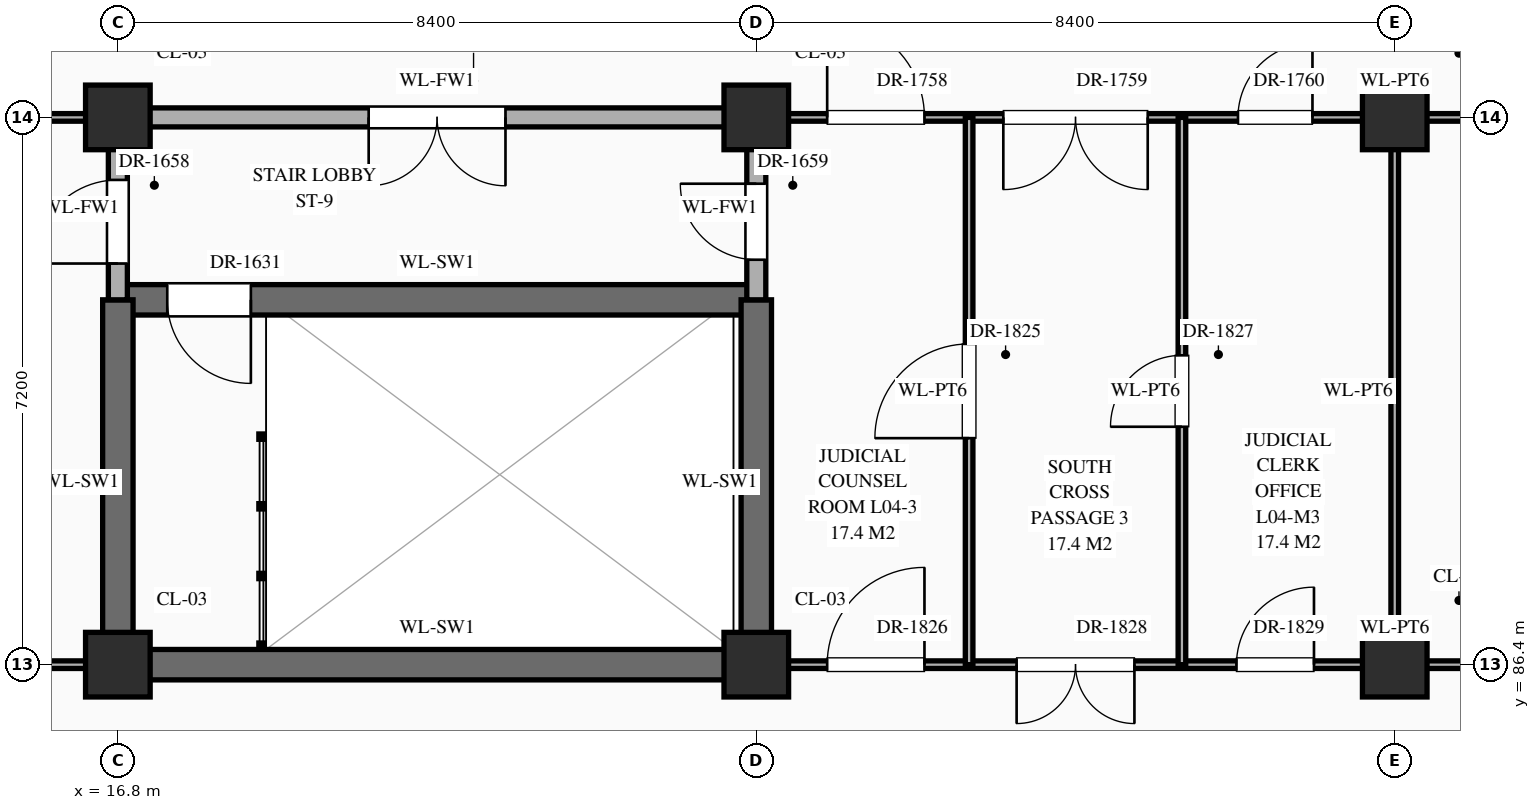
"""IFC4 building model, lengths in metres.
Left out: names, types, materials, properties, quantities, classifications, styles, units other than length and angle.
Written with IfcOpenShell. Run it as: python <this file> out.ifc"""

import sys

from ifc_helpers import new_model, si_unit, direction, frame, frame_2d, origin, origin_2d, place, context, subcontext, project, spatial, rectangle, extrude, element, fill, save


model = new_model("IFC4")
c1 = context("Model", 3, precision=1e-05, world=origin(), true_north=direction((0.0, 1.0)))
c2 = subcontext(c1, "Body", "Model", "MODEL_VIEW")
j1 = project(units=[si_unit("LENGTHUNIT", "METRE"), si_unit("PLANEANGLEUNIT", "RADIAN")], contexts=[c1])
p1 = place(None, origin())
s1 = spatial("IfcSite", under=j1, at=p1, CompositionType="ELEMENT")
p2 = place(p1, origin())
s2 = spatial("IfcBuilding", under=s1, at=p2, CompositionType="ELEMENT")
p3 = place(p2, frame((0.0, 0.0, 16.2)))
s3 = spatial("IfcBuildingStorey", under=s2, at=p3, CompositionType="ELEMENT", Elevation=16.2)
for number, where, z_axis, x_axis in (
    (1, (16.8, 86.4, 0.0), (0.0, 0.0, 1.0), (1.0, 0.0, 0.0)),
    (2, (16.8, 93.6, 0.0), (0.0, 0.0, 1.0), (1.0, 0.0, 0.0)),
    (3, (25.2, 86.4, 0.0), (0.0, 0.0, 1.0), (1.0, 0.0, 0.0)),
    (4, (25.2, 93.6, 0.0), (0.0, 0.0, 1.0), (1.0, 0.0, 0.0)),
    (5, (33.6, 86.4, 0.0), (0.0, 0.0, 1.0), (1.0, 0.0, 0.0)),
    (6, (33.6, 93.6, 0.0), (0.0, 0.0, 1.0), (1.0, 0.0, 0.0)),
):
    element("IfcColumn", number, at=place(p3, frame(where, z_axis=z_axis, x_axis=x_axis)), inside=s3, PredefinedType="COLUMN", context=c2, shape_type="SweptSolid", body=[
        extrude(rectangle(XDim=0.85, YDim=0.85, at=origin_2d()), origin(), (0.0, 0.0, 1.0), 5.4),
    ])
p4 = place(p3, frame((0.04, 86.4, 0.0), z_axis=(0.0, 0.0, 1.0), x_axis=(1.0, 0.0, 0.0)))
e7 = element("IfcWall", 7, at=p4, inside=s3, PredefinedType="STANDARD", context=c2, shape_type="SweptSolid", body=[
    extrude(rectangle(XDim=16.76, YDim=0.1, at=frame_2d((8.38, 0.0))), origin(), (0.0, 0.0, 1.0), 4.35),
])
p5 = place(p4, frame((1.012, 0.0, 0.0)))
e8 = element("IfcOpeningElement", 8, at=p5, cuts=e7, PredefinedType="OPENING", context=c2, shape_type="SweptSolid", body=[
    extrude(rectangle(XDim=1.04, YDim=2.2, at=frame_2d((0.52, 1.1))), frame((0.0, 0.062, 0.0), z_axis=(0.0, -1.0, 0.0), x_axis=(1.0, 0.0, 0.0)), (0.0, 0.0, 1.0), 0.124),
])
p6 = place(p4, frame((3.385, 0.0, 0.0)))
e9 = element("IfcOpeningElement", 9, at=p6, cuts=e7, PredefinedType="OPENING", context=c2, shape_type="SweptSolid", body=[
    extrude(rectangle(XDim=1.55, YDim=2.35, at=frame_2d((0.775, 1.175))), frame((0.0, 0.062, 0.0), z_axis=(0.0, -1.0, 0.0), x_axis=(1.0, 0.0, 0.0)), (0.0, 0.0, 1.0), 0.124),
])
p7 = place(p4, frame((6.208, 0.0, 0.0)))
e10 = element("IfcOpeningElement", 10, at=p7, cuts=e7, PredefinedType="OPENING", context=c2, shape_type="SweptSolid", body=[
    extrude(rectangle(XDim=1.16, YDim=2.3, at=frame_2d((0.58, 1.15))), frame((0.0, 0.062, 0.0), z_axis=(0.0, -1.0, 0.0), x_axis=(1.0, 0.0, 0.0)), (0.0, 0.0, 1.0), 0.124),
])
p8 = place(p4, frame((11.96, 0.0, 0.0)))
e11 = element("IfcOpeningElement", 11, at=p8, cuts=e7, PredefinedType="OPENING", context=c2, shape_type="SweptSolid", body=[
    extrude(rectangle(XDim=1.2, YDim=2.35, at=frame_2d((0.6, 1.175))), frame((0.0, 0.062, 0.0), z_axis=(0.0, -1.0, 0.0), x_axis=(1.0, 0.0, 0.0)), (0.0, 0.0, 1.0), 0.124),
])
p9 = place(p3, frame((16.8, 86.4, 0.0), z_axis=(0.0, 0.0, 1.0), x_axis=(1.0, 0.0, 0.0)))
e12 = element("IfcWall", 12, at=p9, inside=s3, PredefinedType="SHEAR", context=c2, shape_type="SweptSolid", body=[
    extrude(rectangle(XDim=8.4, YDim=0.4, at=frame_2d((4.2, 0.0))), origin(), (0.0, 0.0, 1.0), 5.05),
])
p10 = place(p3, frame((25.2, 86.4, 0.0), z_axis=(0.0, 0.0, 1.0), x_axis=(1.0, 0.0, 0.0)))
e13 = element("IfcWall", 13, at=p10, inside=s3, PredefinedType="STANDARD", context=c2, shape_type="SweptSolid", body=[
    extrude(rectangle(XDim=16.8, YDim=0.1, at=frame_2d((8.4, 0.0))), origin(), (0.0, 0.0, 1.0), 4.27),
])
p11 = place(p10, frame((0.933, 0.0, 0.0)))
e14 = element("IfcOpeningElement", 14, at=p11, cuts=e13, PredefinedType="OPENING", context=c2, shape_type="SweptSolid", body=[
    extrude(rectangle(XDim=1.28, YDim=2.35, at=frame_2d((0.64, 1.175))), frame((0.0, 0.062, 0.0), z_axis=(0.0, -1.0, 0.0), x_axis=(1.0, 0.0, 0.0)), (0.0, 0.0, 1.0), 0.124),
])
p12 = place(p10, frame((3.425, 0.0, 0.0)))
e15 = element("IfcOpeningElement", 15, at=p12, cuts=e13, PredefinedType="OPENING", context=c2, shape_type="SweptSolid", body=[
    extrude(rectangle(XDim=1.55, YDim=2.35, at=frame_2d((0.775, 1.175))), frame((0.0, 0.062, 0.0), z_axis=(0.0, -1.0, 0.0), x_axis=(1.0, 0.0, 0.0)), (0.0, 0.0, 1.0), 0.124),
])
p13 = place(p10, frame((6.317, 0.0, 0.0)))
e16 = element("IfcOpeningElement", 16, at=p13, cuts=e13, PredefinedType="OPENING", context=c2, shape_type="SweptSolid", body=[
    extrude(rectangle(XDim=1.02, YDim=2.4, at=frame_2d((0.51, 1.2))), frame((0.0, 0.062, 0.0), z_axis=(0.0, -1.0, 0.0), x_axis=(1.0, 0.0, 0.0)), (0.0, 0.0, 1.0), 0.124),
])
p14 = place(p10, frame((12.07, 0.0, 0.0)))
e17 = element("IfcOpeningElement", 17, at=p14, cuts=e13, PredefinedType="OPENING", context=c2, shape_type="SweptSolid", body=[
    extrude(rectangle(XDim=1.06, YDim=2.4, at=frame_2d((0.53, 1.2))), frame((0.0, 0.062, 0.0), z_axis=(0.0, -1.0, 0.0), x_axis=(1.0, 0.0, 0.0)), (0.0, 0.0, 1.0), 0.124),
])
p15 = place(p3, frame((16.8, 91.2, 0.0), z_axis=(0.0, 0.0, 1.0), x_axis=(1.0, 0.0, 0.0)))
e18 = element("IfcWall", 18, at=p15, inside=s3, PredefinedType="SHEAR", context=c2, shape_type="SweptSolid", body=[
    extrude(rectangle(XDim=8.4, YDim=0.4, at=frame_2d((4.2, 0.0))), origin(), (0.0, 0.0, 1.0), 5.05),
])
p16 = place(p15, frame((0.65, 0.0, 0.0)))
e19 = element("IfcOpeningElement", 19, at=p16, cuts=e18, PredefinedType="OPENING", context=c2, shape_type="SweptSolid", body=[
    extrude(rectangle(XDim=1.1, YDim=2.2, at=frame_2d((0.55, 1.1))), frame((0.0, 0.212, 0.0), z_axis=(0.0, -1.0, 0.0), x_axis=(1.0, 0.0, 0.0)), (0.0, 0.0, 1.0), 0.424),
])
p17 = place(p3, frame((0.04, 93.6, 0.0), z_axis=(0.0, 0.0, 1.0), x_axis=(1.0, 0.0, 0.0)))
e20 = element("IfcWall", 20, at=p17, inside=s3, PredefinedType="STANDARD", context=c2, shape_type="SweptSolid", body=[
    extrude(rectangle(XDim=16.76, YDim=0.1, at=frame_2d((8.38, 0.0))), origin(), (0.0, 0.0, 1.0), 4.35),
])
p18 = place(p17, frame((0.972, 0.0, 0.0)))
e21 = element("IfcOpeningElement", 21, at=p18, cuts=e20, PredefinedType="OPENING", context=c2, shape_type="SweptSolid", body=[
    extrude(rectangle(XDim=1.12, YDim=2.25, at=frame_2d((0.56, 1.125))), frame((0.0, 0.062, 0.0), z_axis=(0.0, -1.0, 0.0), x_axis=(1.0, 0.0, 0.0)), (0.0, 0.0, 1.0), 0.124),
])
p19 = place(p17, frame((3.335, 0.0, 0.0)))
e22 = element("IfcOpeningElement", 22, at=p19, cuts=e20, PredefinedType="OPENING", context=c2, shape_type="SweptSolid", body=[
    extrude(rectangle(XDim=1.65, YDim=2.4, at=frame_2d((0.825, 1.2))), frame((0.0, 0.062, 0.0), z_axis=(0.0, -1.0, 0.0), x_axis=(1.0, 0.0, 0.0)), (0.0, 0.0, 1.0), 0.124),
])
p20 = place(p17, frame((6.188, 0.0, 0.0)))
e23 = element("IfcOpeningElement", 23, at=p20, cuts=e20, PredefinedType="OPENING", context=c2, shape_type="SweptSolid", body=[
    extrude(rectangle(XDim=1.2, YDim=2.35, at=frame_2d((0.6, 1.175))), frame((0.0, 0.062, 0.0), z_axis=(0.0, -1.0, 0.0), x_axis=(1.0, 0.0, 0.0)), (0.0, 0.0, 1.0), 0.124),
])
p21 = place(p17, frame((11.94, 0.0, 0.0)))
e24 = element("IfcOpeningElement", 24, at=p21, cuts=e20, PredefinedType="OPENING", context=c2, shape_type="SweptSolid", body=[
    extrude(rectangle(XDim=1.24, YDim=2.3, at=frame_2d((0.62, 1.15))), frame((0.0, 0.062, 0.0), z_axis=(0.0, -1.0, 0.0), x_axis=(1.0, 0.0, 0.0)), (0.0, 0.0, 1.0), 0.124),
])
p22 = place(p3, frame((16.8, 93.6, 0.0), z_axis=(0.0, 0.0, 1.0), x_axis=(1.0, 0.0, 0.0)))
e25 = element("IfcWall", 25, at=p22, inside=s3, PredefinedType="STANDARD", context=c2, shape_type="SweptSolid", body=[
    extrude(rectangle(XDim=8.4, YDim=0.25, at=frame_2d((4.2, 0.0))), origin(), (0.0, 0.0, 1.0), 4.2),
])
p23 = place(p22, frame((3.3, 0.0, 0.0)))
e26 = element("IfcOpeningElement", 26, at=p23, cuts=e25, PredefinedType="OPENING", context=c2, shape_type="SweptSolid", body=[
    extrude(rectangle(XDim=1.8, YDim=2.35, at=frame_2d((0.9, 1.175))), frame((0.0, 0.137, 0.0), z_axis=(0.0, -1.0, 0.0), x_axis=(1.0, 0.0, 0.0)), (0.0, 0.0, 1.0), 0.274),
])
p24 = place(p3, frame((25.2, 93.6, 0.0), z_axis=(0.0, 0.0, 1.0), x_axis=(1.0, 0.0, 0.0)))
e27 = element("IfcWall", 27, at=p24, inside=s3, PredefinedType="STANDARD", context=c2, shape_type="SweptSolid", body=[
    extrude(rectangle(XDim=16.8, YDim=0.1, at=frame_2d((8.4, 0.0))), origin(), (0.0, 0.0, 1.0), 4.27),
])
p25 = place(p24, frame((0.933, 0.0, 0.0)))
e28 = element("IfcOpeningElement", 28, at=p25, cuts=e27, PredefinedType="OPENING", context=c2, shape_type="SweptSolid", body=[
    extrude(rectangle(XDim=1.28, YDim=2.35, at=frame_2d((0.64, 1.175))), frame((0.0, 0.062, 0.0), z_axis=(0.0, -1.0, 0.0), x_axis=(1.0, 0.0, 0.0)), (0.0, 0.0, 1.0), 0.124),
])
p26 = place(p24, frame((3.25, 0.0, 0.0)))
e29 = element("IfcOpeningElement", 29, at=p26, cuts=e27, PredefinedType="OPENING", context=c2, shape_type="SweptSolid", body=[
    extrude(rectangle(XDim=1.9, YDim=2.5, at=frame_2d((0.95, 1.25))), frame((0.0, 0.062, 0.0), z_axis=(0.0, -1.0, 0.0), x_axis=(1.0, 0.0, 0.0)), (0.0, 0.0, 1.0), 0.124),
])
p27 = place(p24, frame((6.337, 0.0, 0.0)))
e30 = element("IfcOpeningElement", 30, at=p27, cuts=e27, PredefinedType="OPENING", context=c2, shape_type="SweptSolid", body=[
    extrude(rectangle(XDim=0.98, YDim=2.35, at=frame_2d((0.49, 1.175))), frame((0.0, 0.062, 0.0), z_axis=(0.0, -1.0, 0.0), x_axis=(1.0, 0.0, 0.0)), (0.0, 0.0, 1.0), 0.124),
])
p28 = place(p24, frame((12.09, 0.0, 0.0)))
e31 = element("IfcOpeningElement", 31, at=p28, cuts=e27, PredefinedType="OPENING", context=c2, shape_type="SweptSolid", body=[
    extrude(rectangle(XDim=1.02, YDim=2.4, at=frame_2d((0.51, 1.2))), frame((0.0, 0.062, 0.0), z_axis=(0.0, -1.0, 0.0), x_axis=(1.0, 0.0, 0.0)), (0.0, 0.0, 1.0), 0.124),
])
p29 = place(p3, frame((16.8, 86.4, 0.0), z_axis=(0.0, 0.0, 1.0), x_axis=(0.0, 1.0, 0.0)))
e32 = element("IfcWall", 32, at=p29, inside=s3, PredefinedType="SHEAR", context=c2, shape_type="SweptSolid", body=[
    extrude(rectangle(XDim=4.8, YDim=0.4, at=frame_2d((2.4, 0.0))), origin(), (0.0, 0.0, 1.0), 5.2),
])
p30 = place(p3, frame((16.8, 91.2, 0.0), z_axis=(0.0, 0.0, 1.0), x_axis=(0.0, 1.0, 0.0)))
e33 = element("IfcWall", 33, at=p30, inside=s3, PredefinedType="STANDARD", context=c2, shape_type="SweptSolid", body=[
    extrude(rectangle(XDim=2.4, YDim=0.25, at=frame_2d((1.2, 0.0))), origin(), (0.0, 0.0, 1.0), 4.3),
])
p31 = place(p30, frame((0.478, 0.0, 0.0)))
e34 = element("IfcOpeningElement", 34, at=p31, cuts=e33, PredefinedType="OPENING", context=c2, shape_type="SweptSolid", body=[
    extrude(rectangle(XDim=1.1, YDim=2.2, at=frame_2d((0.55, 1.1))), frame((0.0, 0.137, 0.0), z_axis=(0.0, -1.0, 0.0), x_axis=(1.0, 0.0, 0.0)), (0.0, 0.0, 1.0), 0.274),
])
p32 = place(p3, frame((25.2, 86.4, 0.0), z_axis=(0.0, 0.0, 1.0), x_axis=(0.0, 1.0, 0.0)))
e35 = element("IfcWall", 35, at=p32, inside=s3, PredefinedType="SHEAR", context=c2, shape_type="SweptSolid", body=[
    extrude(rectangle(XDim=4.8, YDim=0.4, at=frame_2d((2.4, 0.0))), origin(), (0.0, 0.0, 1.0), 5.05),
])
p33 = place(p3, frame((25.2, 91.2, 0.0), z_axis=(0.0, 0.0, 1.0), x_axis=(0.0, 1.0, 0.0)))
e36 = element("IfcWall", 36, at=p33, inside=s3, PredefinedType="STANDARD", context=c2, shape_type="SweptSolid", body=[
    extrude(rectangle(XDim=2.4, YDim=0.25, at=frame_2d((1.2, 0.0))), origin(), (0.0, 0.0, 1.0), 4.3),
])
p34 = place(p33, frame((0.528, 0.0, 0.0)))
e37 = element("IfcOpeningElement", 37, at=p34, cuts=e36, PredefinedType="OPENING", context=c2, shape_type="SweptSolid", body=[
    extrude(rectangle(XDim=1.0, YDim=2.2, at=frame_2d((0.5, 1.1))), frame((0.0, 0.137, 0.0), z_axis=(0.0, -1.0, 0.0), x_axis=(1.0, 0.0, 0.0)), (0.0, 0.0, 1.0), 0.274),
])
p35 = place(p3, frame((28.0, 86.4, 0.0), z_axis=(0.0, 0.0, 1.0), x_axis=(0.0, 1.0, 0.0)))
e38 = element("IfcWall", 38, at=p35, inside=s3, PredefinedType="STANDARD", context=c2, shape_type="SweptSolid", body=[
    extrude(rectangle(XDim=7.2, YDim=0.1, at=frame_2d((3.6, 0.0))), origin(), (0.0, 0.0, 1.0), 5.12),
])
p36 = place(p35, frame((2.98, 0.0, 0.0)))
e39 = element("IfcOpeningElement", 39, at=p36, cuts=e38, PredefinedType="OPENING", context=c2, shape_type="SweptSolid", body=[
    extrude(rectangle(XDim=1.24, YDim=2.3, at=frame_2d((0.62, 1.15))), frame((0.0, 0.062, 0.0), z_axis=(0.0, -1.0, 0.0), x_axis=(1.0, 0.0, 0.0)), (0.0, 0.0, 1.0), 0.124),
])
p37 = place(p3, frame((30.8, 86.4, 0.0), z_axis=(0.0, 0.0, 1.0), x_axis=(0.0, 1.0, 0.0)))
e40 = element("IfcWall", 40, at=p37, inside=s3, PredefinedType="STANDARD", context=c2, shape_type="SweptSolid", body=[
    extrude(rectangle(XDim=7.2, YDim=0.1, at=frame_2d((3.6, 0.0))), origin(), (0.0, 0.0, 1.0), 5.12),
])
p38 = place(p37, frame((3.13, 0.0, 0.0)))
e41 = element("IfcOpeningElement", 41, at=p38, cuts=e40, PredefinedType="OPENING", context=c2, shape_type="SweptSolid", body=[
    extrude(rectangle(XDim=0.94, YDim=2.3, at=frame_2d((0.47, 1.15))), frame((0.0, 0.062, 0.0), z_axis=(0.0, -1.0, 0.0), x_axis=(1.0, 0.0, 0.0)), (0.0, 0.0, 1.0), 0.124),
])
p39 = place(p3, frame((33.6, 86.4, 0.0), z_axis=(0.0, 0.0, 1.0), x_axis=(0.0, 1.0, 0.0)))
e42 = element("IfcWall", 42, at=p39, inside=s3, PredefinedType="STANDARD", context=c2, shape_type="SweptSolid", body=[
    extrude(rectangle(XDim=7.2, YDim=0.1, at=frame_2d((3.6, 0.0))), origin(), (0.0, 0.0, 1.0), 4.37),
])
p40 = place(p16, frame((1.1, 0.0, 0.0), z_axis=(0.0, 0.0, 1.0), x_axis=(-1.0, 0.0, 0.0)))
e43 = element("IfcDoor", 43, at=p40, inside=s3, OperationType="SINGLE_SWING_LEFT", PredefinedType="DOOR", context=c2, shape_type="SweptSolid", body=[
    extrude(rectangle(XDim=1.1, YDim=2.2, at=frame_2d((0.55, 1.1))), frame((0.0, 0.025, 0.0), z_axis=(0.0, -1.0, 0.0), x_axis=(1.0, 0.0, 0.0)), (0.0, 0.0, 1.0), 0.05),
])
fill(e19, e43)
p41 = place(p23, frame((1.8, 0.0, 0.0), z_axis=(0.0, 0.0, 1.0), x_axis=(-1.0, 0.0, 0.0)))
e44 = element("IfcDoor", 44, at=p41, inside=s3, OperationType="DOUBLE_DOOR_SINGLE_SWING", PredefinedType="DOOR", context=c2, shape_type="SweptSolid", body=[
    extrude(rectangle(XDim=1.8, YDim=2.35, at=frame_2d((0.9, 1.175))), frame((0.0, 0.025, 0.0), z_axis=(0.0, -1.0, 0.0), x_axis=(1.0, 0.0, 0.0)), (0.0, 0.0, 1.0), 0.05),
])
fill(e26, e44)
p42 = place(p31, origin())
e45 = element("IfcDoor", 45, at=p42, inside=s3, OperationType="SINGLE_SWING_LEFT", PredefinedType="DOOR", context=c2, shape_type="SweptSolid", body=[
    extrude(rectangle(XDim=1.1, YDim=2.2, at=frame_2d((0.55, 1.1))), frame((0.0, 0.025, 0.0), z_axis=(0.0, -1.0, 0.0), x_axis=(1.0, 0.0, 0.0)), (0.0, 0.0, 1.0), 0.05),
])
fill(e34, e45)
p43 = place(p34, origin())
e46 = element("IfcDoor", 46, at=p43, inside=s3, OperationType="SINGLE_SWING_RIGHT", PredefinedType="DOOR", context=c2, shape_type="SweptSolid", body=[
    extrude(rectangle(XDim=1.0, YDim=2.2, at=frame_2d((0.5, 1.1))), frame((0.0, 0.025, 0.0), z_axis=(0.0, -1.0, 0.0), x_axis=(1.0, 0.0, 0.0)), (0.0, 0.0, 1.0), 0.05),
])
fill(e37, e46)
p44 = place(p25, origin())
e47 = element("IfcDoor", 47, at=p44, inside=s3, OperationType="SINGLE_SWING_LEFT", PredefinedType="DOOR", context=c2, shape_type="SweptSolid", body=[
    extrude(rectangle(XDim=1.28, YDim=2.35, at=frame_2d((0.64, 1.175))), frame((0.0, 0.025, 0.0), z_axis=(0.0, -1.0, 0.0), x_axis=(1.0, 0.0, 0.0)), (0.0, 0.0, 1.0), 0.05),
])
fill(e28, e47)
p45 = place(p26, frame((1.9, 0.0, 0.0), z_axis=(0.0, 0.0, 1.0), x_axis=(-1.0, 0.0, 0.0)))
e48 = element("IfcDoor", 48, at=p45, inside=s3, OperationType="DOUBLE_DOOR_SINGLE_SWING", PredefinedType="DOOR", context=c2, shape_type="SweptSolid", body=[
    extrude(rectangle(XDim=1.9, YDim=2.5, at=frame_2d((0.95, 1.25))), frame((0.0, 0.025, 0.0), z_axis=(0.0, -1.0, 0.0), x_axis=(1.0, 0.0, 0.0)), (0.0, 0.0, 1.0), 0.05),
])
fill(e29, e48)
p46 = place(p27, origin())
e49 = element("IfcDoor", 49, at=p46, inside=s3, OperationType="SINGLE_SWING_RIGHT", PredefinedType="DOOR", context=c2, shape_type="SweptSolid", body=[
    extrude(rectangle(XDim=0.98, YDim=2.35, at=frame_2d((0.49, 1.175))), frame((0.0, 0.025, 0.0), z_axis=(0.0, -1.0, 0.0), x_axis=(1.0, 0.0, 0.0)), (0.0, 0.0, 1.0), 0.05),
])
fill(e30, e49)
p47 = place(p36, origin())
e50 = element("IfcDoor", 50, at=p47, inside=s3, OperationType="SINGLE_SWING_LEFT", PredefinedType="DOOR", context=c2, shape_type="SweptSolid", body=[
    extrude(rectangle(XDim=1.24, YDim=2.3, at=frame_2d((0.62, 1.15))), frame((0.0, 0.025, 0.0), z_axis=(0.0, -1.0, 0.0), x_axis=(1.0, 0.0, 0.0)), (0.0, 0.0, 1.0), 0.05),
])
fill(e39, e50)
p48 = place(p11, origin())
e51 = element("IfcDoor", 51, at=p48, inside=s3, OperationType="SINGLE_SWING_RIGHT", PredefinedType="DOOR", context=c2, shape_type="SweptSolid", body=[
    extrude(rectangle(XDim=1.28, YDim=2.35, at=frame_2d((0.64, 1.175))), frame((0.0, 0.025, 0.0), z_axis=(0.0, -1.0, 0.0), x_axis=(1.0, 0.0, 0.0)), (0.0, 0.0, 1.0), 0.05),
])
fill(e14, e51)
p49 = place(p38, origin())
e52 = element("IfcDoor", 52, at=p49, inside=s3, OperationType="SINGLE_SWING_LEFT", PredefinedType="DOOR", context=c2, shape_type="SweptSolid", body=[
    extrude(rectangle(XDim=0.94, YDim=2.3, at=frame_2d((0.47, 1.15))), frame((0.0, 0.025, 0.0), z_axis=(0.0, -1.0, 0.0), x_axis=(1.0, 0.0, 0.0)), (0.0, 0.0, 1.0), 0.05),
])
fill(e41, e52)
p50 = place(p12, frame((1.55, 0.0, 0.0), z_axis=(0.0, 0.0, 1.0), x_axis=(-1.0, 0.0, 0.0)))
e53 = element("IfcDoor", 53, at=p50, inside=s3, OperationType="DOUBLE_DOOR_SINGLE_SWING", PredefinedType="DOOR", context=c2, shape_type="SweptSolid", body=[
    extrude(rectangle(XDim=1.55, YDim=2.35, at=frame_2d((0.775, 1.175))), frame((0.0, 0.025, 0.0), z_axis=(0.0, -1.0, 0.0), x_axis=(1.0, 0.0, 0.0)), (0.0, 0.0, 1.0), 0.05),
])
fill(e15, e53)
p51 = place(p13, origin())
e54 = element("IfcDoor", 54, at=p51, inside=s3, OperationType="SINGLE_SWING_RIGHT", PredefinedType="DOOR", context=c2, shape_type="SweptSolid", body=[
    extrude(rectangle(XDim=1.02, YDim=2.4, at=frame_2d((0.51, 1.2))), frame((0.0, 0.025, 0.0), z_axis=(0.0, -1.0, 0.0), x_axis=(1.0, 0.0, 0.0)), (0.0, 0.0, 1.0), 0.05),
])
fill(e16, e54)
save(model, sys.argv[1])
